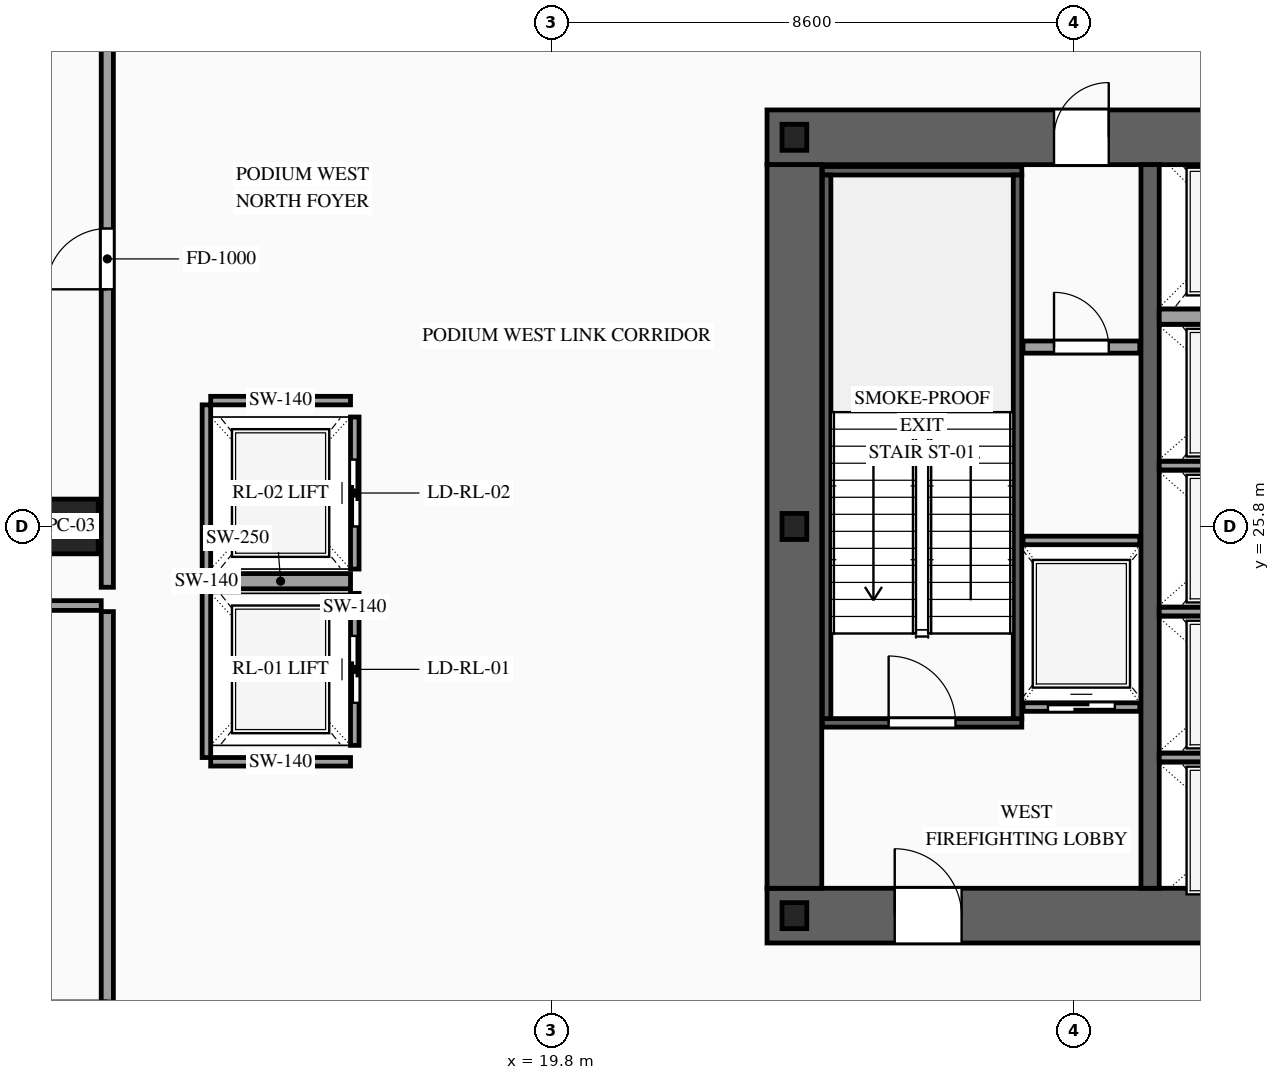
"""IFC4 building model, lengths in metres.
Left out: names, types, materials, properties, quantities, classifications, styles, units other than length and angle.
Written with IfcOpenShell. Run it as: python <this file> out.ifc"""

import sys

from ifc_helpers import new_model, si_unit, direction, frame, frame_2d, origin, origin_2d, place, context, subcontext, project, spatial, rectangle, i_section, extrude, source, transform, mapped, element, fill, save


model = new_model("IFC4")
c1 = context("Model", 3, precision=1e-05, world=origin(), true_north=direction((0.0, 1.0)))
c2 = subcontext(c1, "Body", "Model", "MODEL_VIEW")
j1 = project(units=[si_unit("LENGTHUNIT", "METRE"), si_unit("PLANEANGLEUNIT", "RADIAN")], contexts=[c1])
p1 = place(None, origin())
s1 = spatial("IfcSite", under=j1, at=p1, CompositionType="ELEMENT")
p2 = place(p1, origin())
s2 = spatial("IfcBuilding", under=s1, at=p2, CompositionType="ELEMENT")
p3 = place(p2, frame((0.0, 0.0, 5.4)))
s3 = spatial("IfcBuildingStorey", under=s2, at=p3, CompositionType="ELEMENT", Elevation=5.4)
p4 = place(p3, frame((23.35, 19.4, 0.0), z_axis=(0.0, 0.0, 1.0), x_axis=(1.0, 0.0, 0.0)))
e1 = element("IfcWall", 1, at=p4, inside=s3, PredefinedType="SHEAR", context=c2, shape_type="SweptSolid", body=[
    extrude(rectangle(XDim=27.3, YDim=0.9, at=frame_2d((13.65, 0.0))), origin(), (0.0, 0.0, 1.0), 4.8),
])
p5 = place(p4, frame((2.1, 0.0, 0.0)))
e2 = element("IfcOpeningElement", 2, at=p5, cuts=e1, PredefinedType="OPENING", context=c2, shape_type="SweptSolid", body=[
    extrude(rectangle(XDim=1.1, YDim=2.2, at=frame_2d((0.55, 1.1))), frame((0.0, 0.465, 0.0), z_axis=(0.0, -1.0, 0.0), x_axis=(1.0, 0.0, 0.0)), (0.0, 0.0, 1.0), 0.93),
])
p6 = place(p4, frame((10.0, 0.0, 0.0)))
e3 = element("IfcOpeningElement", 3, at=p6, cuts=e1, PredefinedType="OPENING", context=c2, shape_type="SweptSolid", body=[
    extrude(rectangle(XDim=1.1, YDim=2.2, at=frame_2d((0.55, 1.1))), frame((0.0, 0.465, 0.0), z_axis=(0.0, -1.0, 0.0), x_axis=(1.0, 0.0, 0.0)), (0.0, 0.0, 1.0), 0.93),
])
p7 = place(p4, frame((23.2, 0.0, 0.0)))
e4 = element("IfcOpeningElement", 4, at=p7, cuts=e1, PredefinedType="OPENING", context=c2, shape_type="SweptSolid", body=[
    extrude(rectangle(XDim=1.1, YDim=2.2, at=frame_2d((0.55, 1.1))), frame((0.0, 0.465, 0.0), z_axis=(0.0, -1.0, 0.0), x_axis=(1.0, 0.0, 0.0)), (0.0, 0.0, 1.0), 0.93),
])
p8 = place(p4, frame((19.82, 0.0, 0.0)))
e5 = element("IfcOpeningElement", 5, at=p8, cuts=e1, PredefinedType="OPENING", context=c2, shape_type="SweptSolid", body=[
    extrude(rectangle(XDim=0.9, YDim=2.15, at=frame_2d((0.45, 1.075))), frame((0.0, 0.465, 0.0), z_axis=(0.0, -1.0, 0.0), x_axis=(1.0, 0.0, 0.0)), (0.0, 0.0, 1.0), 0.93),
])
p9 = place(p4, frame((18.38, 0.0, 0.0)))
e6 = element("IfcOpeningElement", 6, at=p9, cuts=e1, PredefinedType="OPENING", context=c2, shape_type="SweptSolid", body=[
    extrude(rectangle(XDim=0.9, YDim=2.15, at=frame_2d((0.45, 1.075))), frame((0.0, 0.465, 0.0), z_axis=(0.0, -1.0, 0.0), x_axis=(1.0, 0.0, 0.0)), (0.0, 0.0, 1.0), 0.93),
])
p10 = place(p3, frame((23.35, 32.2, 0.0), z_axis=(0.0, 0.0, 1.0), x_axis=(1.0, 0.0, 0.0)))
e7 = element("IfcWall", 7, at=p10, inside=s3, PredefinedType="SHEAR", context=c2, shape_type="SweptSolid", body=[
    extrude(rectangle(XDim=27.3, YDim=0.9, at=frame_2d((13.65, 0.0))), origin(), (0.0, 0.0, 1.0), 4.8),
])
p11 = place(p10, frame((4.72, 0.0, 0.0)))
e8 = element("IfcOpeningElement", 8, at=p11, cuts=e7, PredefinedType="OPENING", context=c2, shape_type="SweptSolid", body=[
    extrude(rectangle(XDim=0.9, YDim=2.15, at=frame_2d((0.45, 1.075))), frame((0.0, 0.465, 0.0), z_axis=(0.0, -1.0, 0.0), x_axis=(1.0, 0.0, 0.0)), (0.0, 0.0, 1.0), 0.93),
])
p12 = place(p10, frame((10.0, 0.0, 0.0)))
e9 = element("IfcOpeningElement", 9, at=p12, cuts=e7, PredefinedType="OPENING", context=c2, shape_type="SweptSolid", body=[
    extrude(rectangle(XDim=1.1, YDim=2.2, at=frame_2d((0.55, 1.1))), frame((0.0, 0.465, 0.0), z_axis=(0.0, -1.0, 0.0), x_axis=(1.0, 0.0, 0.0)), (0.0, 0.0, 1.0), 0.93),
])
p13 = place(p10, frame((15.85, 0.0, 0.0)))
e10 = element("IfcOpeningElement", 10, at=p13, cuts=e7, PredefinedType="OPENING", context=c2, shape_type="SweptSolid", body=[
    extrude(rectangle(XDim=1.1, YDim=2.2, at=frame_2d((0.55, 1.1))), frame((0.0, 0.465, 0.0), z_axis=(0.0, -1.0, 0.0), x_axis=(1.0, 0.0, 0.0)), (0.0, 0.0, 1.0), 0.93),
])
p14 = place(p10, frame((18.38, 0.0, 0.0)))
e11 = element("IfcOpeningElement", 11, at=p14, cuts=e7, PredefinedType="OPENING", context=c2, shape_type="SweptSolid", body=[
    extrude(rectangle(XDim=0.9, YDim=2.15, at=frame_2d((0.45, 1.075))), frame((0.0, 0.465, 0.0), z_axis=(0.0, -1.0, 0.0), x_axis=(1.0, 0.0, 0.0)), (0.0, 0.0, 1.0), 0.93),
])
p15 = place(p10, frame((19.82, 0.0, 0.0)))
e12 = element("IfcOpeningElement", 12, at=p15, cuts=e7, PredefinedType="OPENING", context=c2, shape_type="SweptSolid", body=[
    extrude(rectangle(XDim=0.9, YDim=2.15, at=frame_2d((0.45, 1.075))), frame((0.0, 0.465, 0.0), z_axis=(0.0, -1.0, 0.0), x_axis=(1.0, 0.0, 0.0)), (0.0, 0.0, 1.0), 0.93),
])
m1 = source(origin(), c2, "Body", "SweptSolid", [
    extrude(rectangle(XDim=11.9, YDim=0.9, at=frame_2d((5.95, 0.0))), origin(), (0.0, 0.0, 1.0), 4.8),
])
p16 = place(p3, frame((23.8, 19.85, 0.0), z_axis=(0.0, 0.0, 1.0), x_axis=(0.0, 1.0, 0.0)))
e13 = element("IfcWall", 13, at=p16, inside=s3, PredefinedType="SHEAR", context=c2, shape_type="MappedRepresentation", body=[
    mapped(m1, transform((0.0, 0.0, 0.0), scale=1.0)),
])
m2 = source(origin(), c2, "Body", "SweptSolid", [
    extrude(rectangle(XDim=11.9, YDim=0.3, at=frame_2d((5.95, 0.0))), origin(), (0.0, 0.0, 1.0), 4.8),
])
p17 = place(p3, frame((29.65, 19.85, 0.0), z_axis=(0.0, 0.0, 1.0), x_axis=(0.0, 1.0, 0.0)))
e14 = element("IfcWall", 14, at=p17, inside=s3, PredefinedType="SOLIDWALL", context=c2, shape_type="MappedRepresentation", body=[
    mapped(m2, transform((0.0, 0.0, 0.0), scale=1.0)),
])
m3 = source(origin(), c2, "Body", "SweptSolid", [
    extrude(i_section(OverallWidth=0.407, OverallDepth=0.428, WebThickness=0.02, FlangeThickness=0.035, at=origin_2d()), origin(), (0.0, 0.0, 1.0), 4.8),
])
for number, where, z_axis, x_axis in (
    (15, (23.8, 19.4, 0.0), (0.0, 0.0, 1.0), (1.0, 0.0, 0.0)),
    (16, (23.8, 25.8, 0.0), (0.0, 0.0, 1.0), (1.0, 0.0, 0.0)),
    (17, (23.8, 32.2, 0.0), (0.0, 0.0, 1.0), (1.0, 0.0, 0.0)),
):
    element("IfcColumn", number, at=place(p3, frame(where, z_axis=z_axis, x_axis=x_axis)), inside=s3, PredefinedType="COLUMN", context=c2, shape_type="MappedRepresentation", body=[
        mapped(m3, transform((0.0, 0.0, 0.0), scale=1.0)),
    ])
m4 = source(origin(), c2, "Body", "SweptSolid", [
    extrude(rectangle(XDim=0.9, YDim=0.9, at=origin_2d()), origin(), (0.0, 0.0, 1.0), 4.8),
])
p18 = place(p3, frame((11.9, 25.8, 0.0), z_axis=(0.0, 0.0, 1.0), x_axis=(1.0, 0.0, 0.0)))
e18 = element("IfcColumn", 18, at=p18, inside=s3, PredefinedType="COLUMN", context=c2, shape_type="MappedRepresentation", body=[
    mapped(m4, transform((0.0, 0.0, 0.0), scale=1.0)),
])
p19 = place(p3, frame((27.56, 22.83, 0.0), z_axis=(0.0, 0.0, 1.0), x_axis=(1.0, 0.0, 0.0)))
e19 = element("IfcWall", 19, at=p19, inside=s3, PredefinedType="SOLIDWALL", context=c2, shape_type="SweptSolid", body=[
    extrude(rectangle(XDim=1.92, YDim=0.14, at=frame_2d((0.96, 0.0))), origin(), (0.0, 0.0, 1.0), 4.52),
])
p20 = place(p19, frame((0.41, 0.0, 0.0)))
e20 = element("IfcOpeningElement", 20, at=p20, cuts=e19, PredefinedType="OPENING", context=c2, shape_type="SweptSolid", body=[
    extrude(rectangle(XDim=1.1, YDim=2.2, at=frame_2d((0.55, 1.1))), frame((0.0, 0.085, 0.0), z_axis=(0.0, -1.0, 0.0), x_axis=(1.0, 0.0, 0.0)), (0.0, 0.0, 1.0), 0.17),
])
m5 = source(origin(), c2, "Body", "SweptSolid", [
    extrude(rectangle(XDim=1.92, YDim=0.14, at=frame_2d((0.96, 0.0))), origin(), (0.0, 0.0, 1.0), 4.52),
])
p21 = place(p3, frame((27.56, 25.57, 0.0), z_axis=(0.0, 0.0, 1.0), x_axis=(1.0, 0.0, 0.0)))
e21 = element("IfcWall", 21, at=p21, inside=s3, PredefinedType="SOLIDWALL", context=c2, shape_type="MappedRepresentation", body=[
    mapped(m5, transform((0.0, 0.0, 0.0), scale=1.0)),
])
m6 = source(origin(), c2, "Body", "SweptSolid", [
    extrude(rectangle(XDim=2.5, YDim=0.14, at=frame_2d((1.25, 0.0))), origin(), (0.0, 0.0, 1.0), 4.52),
])
for number, where, z_axis, x_axis in (
    (22, (29.8, 22.0, 0.0), (0.0, 0.0, 1.0), (1.0, 0.0, 0.0)),
    (23, (29.8, 24.4, 0.0), (0.0, 0.0, 1.0), (1.0, 0.0, 0.0)),
    (24, (29.8, 26.8, 0.0), (0.0, 0.0, 1.0), (1.0, 0.0, 0.0)),
):
    element("IfcWall", number, at=place(p3, frame(where, z_axis=z_axis, x_axis=x_axis)), inside=s3, PredefinedType="SOLIDWALL", context=c2, shape_type="MappedRepresentation", body=[
        mapped(m6, transform((0.0, 0.0, 0.0), scale=1.0)),
    ])
m7 = source(origin(), c2, "Body", "SweptSolid", [
    extrude(rectangle(XDim=2.5, YDim=0.25, at=frame_2d((1.25, 0.0))), origin(), (0.0, 0.0, 1.0), 4.52),
])
p22 = place(p3, frame((29.8, 29.25, 0.0), z_axis=(0.0, 0.0, 1.0), x_axis=(1.0, 0.0, 0.0)))
e25 = element("IfcWall", 25, at=p22, inside=s3, PredefinedType="SOLIDWALL", context=c2, shape_type="MappedRepresentation", body=[
    mapped(m7, transform((0.0, 0.0, 0.0), scale=1.0)),
])
p23 = place(p3, frame((16.57, 22.2, 0.0), z_axis=(0.0, 0.0, 1.0), x_axis=(0.0, 1.0, 0.0)))
e26 = element("IfcWall", 26, at=p23, inside=s3, PredefinedType="SOLIDWALL", context=c2, shape_type="SweptSolid", body=[
    extrude(rectangle(XDim=2.5, YDim=0.14, at=frame_2d((1.25, 0.0))), origin(), (0.0, 0.0, 1.0), 4.52),
])
p24 = place(p23, frame((0.7, 0.0, 0.0)))
e27 = element("IfcOpeningElement", 27, at=p24, cuts=e26, PredefinedType="OPENING", context=c2, shape_type="SweptSolid", body=[
    extrude(rectangle(XDim=1.1, YDim=2.2, at=frame_2d((0.55, 1.1))), frame((0.0, 0.085, 0.0), z_axis=(0.0, -1.0, 0.0), x_axis=(1.0, 0.0, 0.0)), (0.0, 0.0, 1.0), 0.17),
])
m8 = source(origin(), c2, "Body", "SweptSolid", [
    extrude(rectangle(XDim=2.3, YDim=0.25, at=frame_2d((1.15, 0.0))), origin(), (0.0, 0.0, 1.0), 4.52),
])
p25 = place(p3, frame((14.2, 24.9, 0.0), z_axis=(0.0, 0.0, 1.0), x_axis=(1.0, 0.0, 0.0)))
e28 = element("IfcWall", 28, at=p25, inside=s3, PredefinedType="SOLIDWALL", context=c2, shape_type="MappedRepresentation", body=[
    mapped(m8, transform((0.0, 0.0, 0.0), scale=1.0)),
])
m9 = source(origin(), c2, "Body", "SweptSolid", [
    extrude(rectangle(XDim=5.8, YDim=0.14, at=frame_2d((2.9, 0.0))), origin(), (0.0, 0.0, 1.0), 4.52),
])
p26 = place(p3, frame((14.13, 22.0, 0.0), z_axis=(0.0, 0.0, 1.0), x_axis=(0.0, 1.0, 0.0)))
e29 = element("IfcWall", 29, at=p26, inside=s3, PredefinedType="SOLIDWALL", context=c2, shape_type="MappedRepresentation", body=[
    mapped(m9, transform((0.0, 0.0, 0.0), scale=1.0)),
])
m10 = source(origin(), c2, "Body", "SweptSolid", [
    extrude(rectangle(XDim=2.3, YDim=0.14, at=frame_2d((1.15, 0.0))), origin(), (0.0, 0.0, 1.0), 4.52),
])
p27 = place(p3, frame((14.2, 21.93, 0.0), z_axis=(0.0, 0.0, 1.0), x_axis=(1.0, 0.0, 0.0)))
e30 = element("IfcWall", 30, at=p27, inside=s3, PredefinedType="SOLIDWALL", context=c2, shape_type="MappedRepresentation", body=[
    mapped(m10, transform((0.0, 0.0, 0.0), scale=1.0)),
])
p28 = place(p3, frame((16.57, 25.1, 0.0), z_axis=(0.0, 0.0, 1.0), x_axis=(0.0, 1.0, 0.0)))
e31 = element("IfcWall", 31, at=p28, inside=s3, PredefinedType="SOLIDWALL", context=c2, shape_type="SweptSolid", body=[
    extrude(rectangle(XDim=2.5, YDim=0.14, at=frame_2d((1.25, 0.0))), origin(), (0.0, 0.0, 1.0), 4.52),
])
p29 = place(p28, frame((0.7, 0.0, 0.0)))
e32 = element("IfcOpeningElement", 32, at=p29, cuts=e31, PredefinedType="OPENING", context=c2, shape_type="SweptSolid", body=[
    extrude(rectangle(XDim=1.1, YDim=2.2, at=frame_2d((0.55, 1.1))), frame((0.0, 0.085, 0.0), z_axis=(0.0, -1.0, 0.0), x_axis=(1.0, 0.0, 0.0)), (0.0, 0.0, 1.0), 0.17),
])
p30 = place(p3, frame((14.2, 27.87, 0.0), z_axis=(0.0, 0.0, 1.0), x_axis=(1.0, 0.0, 0.0)))
e33 = element("IfcWall", 33, at=p30, inside=s3, PredefinedType="SOLIDWALL", context=c2, shape_type="MappedRepresentation", body=[
    mapped(m10, transform((0.0, 0.0, 0.0), scale=1.0)),
])
p31 = place(p3, frame((24.26, 22.57, 0.0), z_axis=(0.0, 0.0, 1.0), x_axis=(1.0, 0.0, 0.0)))
e34 = element("IfcWall", 34, at=p31, inside=s3, PredefinedType="SOLIDWALL", context=c2, shape_type="SweptSolid", body=[
    extrude(rectangle(XDim=3.28, YDim=0.14, at=frame_2d((1.64, 0.0))), origin(), (0.0, 0.0, 1.0), 4.52),
])
p32 = place(p31, frame((1.09, 0.0, 0.0)))
e35 = element("IfcOpeningElement", 35, at=p32, cuts=e34, PredefinedType="OPENING", context=c2, shape_type="SweptSolid", body=[
    extrude(rectangle(XDim=1.1, YDim=2.2, at=frame_2d((0.55, 1.1))), frame((0.0, 0.085, 0.0), z_axis=(0.0, -1.0, 0.0), x_axis=(1.0, 0.0, 0.0)), (0.0, 0.0, 1.0), 0.17),
])
m11 = source(origin(), c2, "Body", "SweptSolid", [
    extrude(rectangle(XDim=3.28, YDim=0.14, at=frame_2d((1.64, 0.0))), origin(), (0.0, 0.0, 1.0), 4.52),
])
p33 = place(p3, frame((24.26, 31.65, 0.0), z_axis=(0.0, 0.0, 1.0), x_axis=(1.0, 0.0, 0.0)))
e36 = element("IfcWall", 36, at=p33, inside=s3, PredefinedType="SOLIDWALL", context=c2, shape_type="MappedRepresentation", body=[
    mapped(m11, transform((0.0, 0.0, 0.0), scale=1.0)),
])
m12 = source(origin(), c2, "Body", "SweptSolid", [
    extrude(rectangle(XDim=8.94, YDim=0.14, at=frame_2d((4.47, 0.0))), origin(), (0.0, 0.0, 1.0), 4.52),
])
for number, where, z_axis, x_axis in (
    (37, (24.33, 22.64, 0.0), (0.0, 0.0, 1.0), (0.0, 1.0, 0.0)),
    (38, (27.47, 22.64, 0.0), (0.0, 0.0, 1.0), (0.0, 1.0, 0.0)),
):
    element("IfcWall", number, at=place(p3, frame(where, z_axis=z_axis, x_axis=x_axis)), inside=s3, PredefinedType="SOLIDWALL", context=c2, shape_type="MappedRepresentation", body=[
        mapped(m12, transform((0.0, 0.0, 0.0), scale=1.0)),
    ])
p34 = place(p3, frame((27.56, 28.75, 0.0), z_axis=(0.0, 0.0, 1.0), x_axis=(1.0, 0.0, 0.0)))
e39 = element("IfcWall", 39, at=p34, inside=s3, PredefinedType="PARTITIONING", context=c2, shape_type="SweptSolid", body=[
    extrude(rectangle(XDim=1.92, YDim=0.2, at=frame_2d((0.96, 0.0))), origin(), (0.0, 0.0, 1.0), 4.52),
])
p35 = place(p34, frame((0.51, 0.0, 0.0)))
e40 = element("IfcOpeningElement", 40, at=p35, cuts=e39, PredefinedType="OPENING", context=c2, shape_type="SweptSolid", body=[
    extrude(rectangle(XDim=0.9, YDim=2.15, at=frame_2d((0.45, 1.075))), frame((0.0, 0.115, 0.0), z_axis=(0.0, -1.0, 0.0), x_axis=(1.0, 0.0, 0.0)), (0.0, 0.0, 1.0), 0.23),
])
p36 = place(p3, frame((12.5, 12.0, 0.0), z_axis=(0.0, 0.0, 1.0), x_axis=(0.0, 1.0, 0.0)))
e41 = element("IfcWall", 41, at=p36, inside=s3, PredefinedType="PARTITIONING", context=c2, shape_type="SweptSolid", body=[
    extrude(rectangle(XDim=12.4, YDim=0.2, at=frame_2d((6.2, 0.0))), origin(), (0.0, 0.0, 1.0), 4.52),
])
p37 = place(p36, frame((5.0, 0.0, 0.0)))
e42 = element("IfcOpeningElement", 42, at=p37, cuts=e41, PredefinedType="OPENING", context=c2, shape_type="SweptSolid", body=[
    extrude(rectangle(XDim=1.0, YDim=2.2, at=frame_2d((0.5, 1.1))), frame((0.0, 0.115, 0.0), z_axis=(0.0, -1.0, 0.0), x_axis=(1.0, 0.0, 0.0)), (0.0, 0.0, 1.0), 0.23),
])
m13 = source(origin(), c2, "Body", "SweptSolid", [
    extrude(rectangle(XDim=10.22, YDim=0.16, at=frame_2d((5.11, 0.0))), origin(), (0.0, 0.0, 1.0), 4.52),
])
p38 = place(p3, frame((2.18, 24.5, 0.0), z_axis=(0.0, 0.0, 1.0), x_axis=(1.0, 0.0, 0.0)))
e43 = element("IfcWall", 43, at=p38, inside=s3, PredefinedType="PARTITIONING", context=c2, shape_type="MappedRepresentation", body=[
    mapped(m13, transform((0.0, 0.0, 0.0), scale=1.0)),
])
p39 = place(p3, frame((12.5, 24.8, 0.0), z_axis=(0.0, 0.0, 1.0), x_axis=(0.0, 1.0, 0.0)))
e44 = element("IfcWall", 44, at=p39, inside=s3, PredefinedType="PARTITIONING", context=c2, shape_type="SweptSolid", body=[
    extrude(rectangle(XDim=24.82, YDim=0.2, at=frame_2d((12.41, 0.0))), origin(), (0.0, 0.0, 1.0), 4.52),
])
p40 = place(p39, frame((4.9, 0.0, 0.0)))
e45 = element("IfcOpeningElement", 45, at=p40, cuts=e44, PredefinedType="OPENING", context=c2, shape_type="SweptSolid", body=[
    extrude(rectangle(XDim=1.0, YDim=2.2, at=frame_2d((0.5, 1.1))), frame((0.0, 0.115, 0.0), z_axis=(0.0, -1.0, 0.0), x_axis=(1.0, 0.0, 0.0)), (0.0, 0.0, 1.0), 0.23),
])
m14 = source(origin(), c2, "Body", "SweptSolid", [
    extrude(rectangle(XDim=1.1, YDim=2.2, at=frame_2d((0.55, 1.1))), frame((0.0, 0.025, 0.0), z_axis=(0.0, -1.0, 0.0), x_axis=(1.0, 0.0, 0.0)), (0.0, 0.0, 1.0), 0.05),
])
p41 = place(p20, origin())
e46 = element("IfcDoor", 46, at=p41, inside=s3, OperationType="SLIDING_TO_LEFT", PredefinedType="DOOR", context=c2, shape_type="MappedRepresentation", body=[
    mapped(m14, transform((0.0, 0.0, 0.0), scale=1.0)),
])
fill(e20, e46)
p42 = place(p24, origin())
e47 = element("IfcDoor", 47, at=p42, inside=s3, OperationType="SLIDING_TO_RIGHT", PredefinedType="DOOR", context=c2, shape_type="MappedRepresentation", body=[
    mapped(m14, transform((0.0, 0.0, 0.0), scale=1.0)),
])
fill(e27, e47)
p43 = place(p29, origin())
e48 = element("IfcDoor", 48, at=p43, inside=s3, OperationType="SLIDING_TO_LEFT", PredefinedType="DOOR", context=c2, shape_type="MappedRepresentation", body=[
    mapped(m14, transform((0.0, 0.0, 0.0), scale=1.0)),
])
fill(e32, e48)
m15 = source(origin(), c2, "Body", "SweptSolid", [
    extrude(rectangle(XDim=1.1, YDim=2.2, at=frame_2d((0.55, 1.1))), frame((0.0, 0.025, 0.0), z_axis=(0.0, -1.0, 0.0), x_axis=(1.0, 0.0, 0.0)), (0.0, 0.0, 1.0), 0.05),
])
p44 = place(p32, origin())
e49 = element("IfcDoor", 49, at=p44, inside=s3, OperationType="SINGLE_SWING_LEFT", PredefinedType="DOOR", context=c2, shape_type="MappedRepresentation", body=[
    mapped(m15, transform((0.0, 0.0, 0.0), scale=1.0)),
])
fill(e35, e49)
p45 = place(p5, origin())
e50 = element("IfcDoor", 50, at=p45, inside=s3, OperationType="SINGLE_SWING_LEFT", PredefinedType="DOOR", context=c2, shape_type="MappedRepresentation", body=[
    mapped(m15, transform((0.0, 0.0, 0.0), scale=1.0)),
])
fill(e2, e50)
m16 = source(origin(), c2, "Body", "SweptSolid", [
    extrude(rectangle(XDim=0.9, YDim=2.15, at=frame_2d((0.45, 1.075))), frame((0.0, 0.025, 0.0), z_axis=(0.0, -1.0, 0.0), x_axis=(1.0, 0.0, 0.0)), (0.0, 0.0, 1.0), 0.05),
])
p46 = place(p11, origin())
e51 = element("IfcDoor", 51, at=p46, inside=s3, OperationType="SINGLE_SWING_RIGHT", PredefinedType="DOOR", context=c2, shape_type="MappedRepresentation", body=[
    mapped(m16, transform((0.0, 0.0, 0.0), scale=1.0)),
])
fill(e8, e51)
p47 = place(p35, origin())
e52 = element("IfcDoor", 52, at=p47, inside=s3, OperationType="SINGLE_SWING_LEFT", PredefinedType="DOOR", context=c2, shape_type="MappedRepresentation", body=[
    mapped(m16, transform((0.0, 0.0, 0.0), scale=1.0)),
])
fill(e40, e52)
m17 = source(origin(), c2, "Body", "SweptSolid", [
    extrude(rectangle(XDim=1.0, YDim=2.2, at=frame_2d((0.5, 1.1))), frame((0.0, 0.025, 0.0), z_axis=(0.0, -1.0, 0.0), x_axis=(1.0, 0.0, 0.0)), (0.0, 0.0, 1.0), 0.05),
])
p48 = place(p40, origin())
e53 = element("IfcDoor", 53, at=p48, inside=s3, OperationType="SINGLE_SWING_LEFT", PredefinedType="DOOR", context=c2, shape_type="MappedRepresentation", body=[
    mapped(m17, transform((0.0, 0.0, 0.0), scale=1.0)),
])
fill(e45, e53)
save(model, sys.argv[1])
